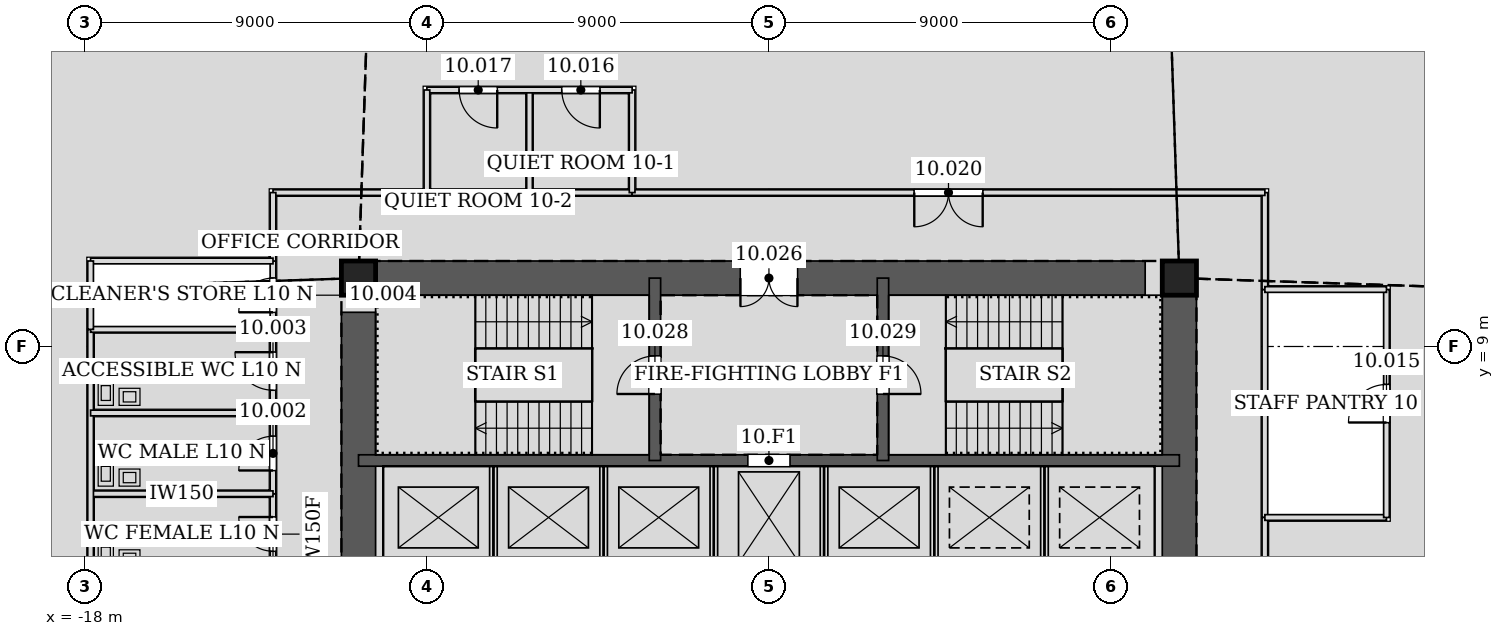
"""IFC4 building model, lengths in metres.
Left out: names, types, materials, properties, quantities, classifications, styles, units other than length and angle.
Written with IfcOpenShell. Run it as: python <this file> out.ifc"""

import sys

from ifc_helpers import new_model, si_unit, direction, frame, frame_2d, origin, origin_2d, place, context, subcontext, project, spatial, rectangle, hollow_rectangle, extrude, element, fill, save


model = new_model("IFC4")
c1 = context("Model", 3, precision=1e-05, world=origin(), true_north=direction((0.0, 1.0)))
c2 = subcontext(c1, "Body", "Model", "MODEL_VIEW")
j1 = project(units=[si_unit("LENGTHUNIT", "METRE"), si_unit("PLANEANGLEUNIT", "RADIAN")], contexts=[c1])
p1 = place(None, origin())
s1 = spatial("IfcSite", under=j1, at=p1, CompositionType="ELEMENT")
p2 = place(p1, origin())
s2 = spatial("IfcBuilding", under=s1, at=p2, CompositionType="ELEMENT")
p3 = place(p2, frame((0.0, 0.0, 49.8)))
s3 = spatial("IfcBuildingStorey", under=s2, at=p3, CompositionType="ELEMENT", Elevation=49.8)
for number, where, z_axis, x_axis in (
    (1, (10.8, 10.8, 0.0), (0.0, 0.0, 1.0), (1.0, 0.0, 0.0)),
    (2, (-10.8, 10.8, 0.0), (0.0, 0.0, 1.0), (1.0, 0.0, 0.0)),
):
    element("IfcColumn", number, at=place(p3, frame(where, z_axis=z_axis, x_axis=x_axis)), inside=s3, PredefinedType="COLUMN", context=c2, shape_type="SweptSolid", body=[
        extrude(hollow_rectangle(XDim=0.9, YDim=0.9, WallThickness=0.06, at=origin_2d()), origin(), (0.0, 0.0, 1.0), 4.2),
    ])
p4 = place(p3, frame((10.8, -10.8, 0.0), z_axis=(0.0, 0.0, 1.0), x_axis=(0.0, 1.0, 0.0)))
e3 = element("IfcWall", 3, at=p4, inside=s3, PredefinedType="SOLIDWALL", context=c2, shape_type="SweptSolid", body=[
    extrude(rectangle(XDim=21.6, YDim=0.9, at=frame_2d((10.8, 0.0))), origin(), (0.0, 0.0, 1.0), 4.2),
])
p5 = place(p4, frame((11.7, 0.0, 0.0)))
e4 = element("IfcOpeningElement", 4, at=p5, cuts=e3, PredefinedType="OPENING", context=c2, shape_type="SweptSolid", body=[
    extrude(rectangle(XDim=1.2, YDim=2.1, at=frame_2d((0.6, 1.05))), frame((0.0, 0.46, 0.0), z_axis=(0.0, -1.0, 0.0), x_axis=(1.0, 0.0, 0.0)), (0.0, 0.0, 1.0), 0.92),
])
p6 = place(p4, frame((8.7, 0.0, 0.0)))
e5 = element("IfcOpeningElement", 5, at=p6, cuts=e3, PredefinedType="OPENING", context=c2, shape_type="SweptSolid", body=[
    extrude(rectangle(XDim=1.2, YDim=2.1, at=frame_2d((0.6, 1.05))), frame((0.0, 0.46, 0.0), z_axis=(0.0, -1.0, 0.0), x_axis=(1.0, 0.0, 0.0)), (0.0, 0.0, 1.0), 0.92),
])
p7 = place(p3, frame((10.8, 10.8, 0.0), z_axis=(0.0, 0.0, 1.0), x_axis=(-1.0, 0.0, 0.0)))
e6 = element("IfcWall", 6, at=p7, inside=s3, PredefinedType="SOLIDWALL", context=c2, shape_type="SweptSolid", body=[
    extrude(rectangle(XDim=21.6, YDim=0.9, at=frame_2d((10.8, 0.0))), origin(), (0.0, 0.0, 1.0), 4.2),
])
p8 = place(p7, frame((10.05, 0.0, 0.0)))
e7 = element("IfcOpeningElement", 7, at=p8, cuts=e6, PredefinedType="OPENING", context=c2, shape_type="SweptSolid", body=[
    extrude(rectangle(XDim=1.5, YDim=2.1, at=frame_2d((0.75, 1.05))), frame((0.0, 0.46, 0.0), z_axis=(0.0, -1.0, 0.0), x_axis=(1.0, 0.0, 0.0)), (0.0, 0.0, 1.0), 0.92),
])
p9 = place(p3, frame((-10.8, 10.8, 0.0), z_axis=(0.0, 0.0, 1.0), x_axis=(0.0, -1.0, 0.0)))
e8 = element("IfcWall", 8, at=p9, inside=s3, PredefinedType="SOLIDWALL", context=c2, shape_type="SweptSolid", body=[
    extrude(rectangle(XDim=21.6, YDim=0.9, at=frame_2d((10.8, 0.0))), origin(), (0.0, 0.0, 1.0), 4.2),
])
p10 = place(p9, frame((8.7, 0.0, 0.0)))
e9 = element("IfcOpeningElement", 9, at=p10, cuts=e8, PredefinedType="OPENING", context=c2, shape_type="SweptSolid", body=[
    extrude(rectangle(XDim=1.2, YDim=2.1, at=frame_2d((0.6, 1.05))), frame((0.0, 0.46, 0.0), z_axis=(0.0, -1.0, 0.0), x_axis=(1.0, 0.0, 0.0)), (0.0, 0.0, 1.0), 0.92),
])
p11 = place(p9, frame((11.7, 0.0, 0.0)))
e10 = element("IfcOpeningElement", 10, at=p11, cuts=e8, PredefinedType="OPENING", context=c2, shape_type="SweptSolid", body=[
    extrude(rectangle(XDim=1.2, YDim=2.1, at=frame_2d((0.6, 1.05))), frame((0.0, 0.46, 0.0), z_axis=(0.0, -1.0, 0.0), x_axis=(1.0, 0.0, 0.0)), (0.0, 0.0, 1.0), 0.92),
])
p12 = place(p3, frame((-10.8, 6.0, 0.0), z_axis=(0.0, 0.0, 1.0), x_axis=(1.0, 0.0, 0.0)))
e11 = element("IfcWall", 11, at=p12, inside=s3, PredefinedType="SOLIDWALL", context=c2, shape_type="SweptSolid", body=[
    extrude(rectangle(XDim=21.6, YDim=0.3, at=frame_2d((10.8, 0.0))), origin(), (0.0, 0.0, 1.0), 4.2),
])
p13 = place(p12, frame((10.25, 0.0, 0.0)))
e12 = element("IfcOpeningElement", 12, at=p13, cuts=e11, PredefinedType="OPENING", context=c2, shape_type="SweptSolid", body=[
    extrude(rectangle(XDim=1.1, YDim=2.1, at=frame_2d((0.55, 1.05))), frame((0.0, 0.16, 0.0), z_axis=(0.0, -1.0, 0.0), x_axis=(1.0, 0.0, 0.0)), (0.0, 0.0, 1.0), 0.32),
])
p14 = place(p3, frame((-3.0, 6.0, 0.0), z_axis=(0.0, 0.0, 1.0), x_axis=(0.0, 1.0, 0.0)))
e13 = element("IfcWall", 13, at=p14, inside=s3, PredefinedType="SOLIDWALL", context=c2, shape_type="SweptSolid", body=[
    extrude(rectangle(XDim=4.8, YDim=0.3, at=frame_2d((2.4, 0.0))), origin(), (0.0, 0.0, 1.0), 4.2),
])
p15 = place(p14, frame((1.75, 0.0, 0.0)))
e14 = element("IfcOpeningElement", 14, at=p15, cuts=e13, PredefinedType="OPENING", context=c2, shape_type="SweptSolid", body=[
    extrude(rectangle(XDim=1.0, YDim=2.1, at=frame_2d((0.5, 1.05))), frame((0.0, 0.16, 0.0), z_axis=(0.0, -1.0, 0.0), x_axis=(1.0, 0.0, 0.0)), (0.0, 0.0, 1.0), 0.32),
])
p16 = place(p3, frame((3.0, 6.0, 0.0), z_axis=(0.0, 0.0, 1.0), x_axis=(0.0, 1.0, 0.0)))
e15 = element("IfcWall", 15, at=p16, inside=s3, PredefinedType="SOLIDWALL", context=c2, shape_type="SweptSolid", body=[
    extrude(rectangle(XDim=4.8, YDim=0.3, at=frame_2d((2.4, 0.0))), origin(), (0.0, 0.0, 1.0), 4.2),
])
p17 = place(p16, frame((1.75, 0.0, 0.0)))
e16 = element("IfcOpeningElement", 16, at=p17, cuts=e15, PredefinedType="OPENING", context=c2, shape_type="SweptSolid", body=[
    extrude(rectangle(XDim=1.0, YDim=2.1, at=frame_2d((0.5, 1.05))), frame((0.0, 0.16, 0.0), z_axis=(0.0, -1.0, 0.0), x_axis=(1.0, 0.0, 0.0)), (0.0, 0.0, 1.0), 0.32),
])
p18 = place(p3, frame((-13.05, 5.126, 0.0), z_axis=(0.0, 0.0, 1.0), x_axis=(0.0, -1.0, 0.0)))
e17 = element("IfcWall", 17, at=p18, inside=s3, PredefinedType="PARTITIONING", context=c2, shape_type="SweptSolid", body=[
    extrude(rectangle(XDim=2.127, YDim=0.15, at=frame_2d((1.063, 0.0))), origin(), (0.0, 0.0, 1.0), 4.035),
])
p19 = place(p18, frame((0.614, 0.0, 0.0)))
e18 = element("IfcOpeningElement", 18, at=p19, cuts=e17, PredefinedType="OPENING", context=c2, shape_type="SweptSolid", body=[
    extrude(rectangle(XDim=0.9, YDim=2.1, at=frame_2d((0.45, 1.05))), frame((0.0, 0.085, 0.0), z_axis=(0.0, -1.0, 0.0), x_axis=(1.0, 0.0, 0.0)), (0.0, 0.0, 1.0), 0.17),
])
p20 = place(p3, frame((-13.05, 7.251, 0.0), z_axis=(0.0, 0.0, 1.0), x_axis=(0.0, -1.0, 0.0)))
e19 = element("IfcWall", 19, at=p20, inside=s3, PredefinedType="PARTITIONING", context=c2, shape_type="SweptSolid", body=[
    extrude(rectangle(XDim=2.127, YDim=0.15, at=frame_2d((1.063, 0.0))), origin(), (0.0, 0.0, 1.0), 4.035),
])
p21 = place(p20, frame((0.614, 0.0, 0.0)))
e20 = element("IfcOpeningElement", 20, at=p21, cuts=e19, PredefinedType="OPENING", context=c2, shape_type="SweptSolid", body=[
    extrude(rectangle(XDim=0.9, YDim=2.1, at=frame_2d((0.45, 1.05))), frame((0.0, 0.085, 0.0), z_axis=(0.0, -1.0, 0.0), x_axis=(1.0, 0.0, 0.0)), (0.0, 0.0, 1.0), 0.17),
])
p22 = place(p3, frame((-13.05, 9.451, 0.0), z_axis=(0.0, 0.0, 1.0), x_axis=(0.0, -1.0, 0.0)))
e21 = element("IfcWall", 21, at=p22, inside=s3, PredefinedType="PARTITIONING", context=c2, shape_type="SweptSolid", body=[
    extrude(rectangle(XDim=2.202, YDim=0.15, at=frame_2d((1.101, 0.0))), origin(), (0.0, 0.0, 1.0), 4.035),
])
p23 = place(p22, frame((0.601, 0.0, 0.0)))
e22 = element("IfcOpeningElement", 22, at=p23, cuts=e21, PredefinedType="OPENING", context=c2, shape_type="SweptSolid", body=[
    extrude(rectangle(XDim=1.0, YDim=2.1, at=frame_2d((0.5, 1.05))), frame((0.0, 0.085, 0.0), z_axis=(0.0, -1.0, 0.0), x_axis=(1.0, 0.0, 0.0)), (0.0, 0.0, 1.0), 0.17),
])
p24 = place(p3, frame((-13.05, 11.251, 0.0), z_axis=(0.0, 0.0, 1.0), x_axis=(0.0, -1.0, 0.0)))
e23 = element("IfcWall", 23, at=p24, inside=s3, PredefinedType="PARTITIONING", context=c2, shape_type="SweptSolid", body=[
    extrude(rectangle(XDim=1.802, YDim=0.15, at=frame_2d((0.901, 0.0))), origin(), (0.0, 0.0, 1.0), 3.014),
])
p25 = place(p24, frame((0.451, 0.0, 0.0)))
e24 = element("IfcOpeningElement", 24, at=p25, cuts=e23, PredefinedType="OPENING", context=c2, shape_type="SweptSolid", body=[
    extrude(rectangle(XDim=0.9, YDim=2.1, at=frame_2d((0.45, 1.05))), frame((0.0, 0.085, 0.0), z_axis=(0.0, -1.0, 0.0), x_axis=(1.0, 0.0, 0.0)), (0.0, 0.0, 1.0), 0.17),
])
p26 = place(p3, frame((13.05, 4.499, 0.0), z_axis=(0.0, 0.0, 1.0), x_axis=(0.0, 1.0, 0.0)))
e25 = element("IfcWall", 25, at=p26, inside=s3, PredefinedType="PARTITIONING", context=c2, shape_type="SweptSolid", body=[
    extrude(rectangle(XDim=6.002, YDim=0.15, at=frame_2d((3.001, 0.0))), origin(), (0.0, 0.0, 1.0), 4.035),
])
for number, where, z_axis, x_axis in (
    (26, (-3.599, 13.05, 0.0), (0.0, 0.0, 1.0), (-1.0, 0.0, 0.0)),
    (27, (-6.299, 13.05, 0.0), (0.0, 0.0, 1.0), (-1.0, 0.0, 0.0)),
):
    element("IfcWall", number, at=place(p3, frame(where, z_axis=z_axis, x_axis=x_axis)), inside=s3, PredefinedType="PARTITIONING", context=c2, shape_type="SweptSolid", body=[
        extrude(rectangle(XDim=2.702, YDim=0.15, at=frame_2d((1.351, 0.0))), origin(), (0.0, 0.0, 1.0), 4.035),
    ])
p27 = place(p3, frame((-8.999, 13.05, 0.0), z_axis=(0.0, 0.0, 1.0), x_axis=(-1.0, 0.0, 0.0)))
e28 = element("IfcWall", 28, at=p27, inside=s3, PredefinedType="PARTITIONING", context=c2, shape_type="SweptSolid", body=[
    extrude(rectangle(XDim=4.051, YDim=0.15, at=frame_2d((2.025, 0.0))), origin(), (0.0, 0.0, 1.0), 3.014),
])
p28 = place(p3, frame((-13.05, 13.05, 0.0), z_axis=(0.0, 0.0, 1.0), x_axis=(0.0, -1.0, 0.0)))
e29 = element("IfcWall", 29, at=p28, inside=s3, PredefinedType="PARTITIONING", context=c2, shape_type="SweptSolid", body=[
    extrude(rectangle(XDim=1.801, YDim=0.15, at=frame_2d((0.9, 0.0))), origin(), (0.0, 0.0, 1.0), 3.098),
])
p29 = place(p3, frame((13.05, 10.499, 0.0), z_axis=(0.0, 0.0, 1.0), x_axis=(0.0, 1.0, 0.0)))
e30 = element("IfcWall", 30, at=p29, inside=s3, PredefinedType="PARTITIONING", context=c2, shape_type="SweptSolid", body=[
    extrude(rectangle(XDim=2.551, YDim=0.15, at=frame_2d((1.275, 0.0))), origin(), (0.0, 0.0, 1.0), 3.014),
])
p30 = place(p3, frame((13.05, 13.05, 0.0), z_axis=(0.0, 0.0, 1.0), x_axis=(-1.0, 0.0, 0.0)))
e31 = element("IfcWall", 31, at=p30, inside=s3, PredefinedType="PARTITIONING", context=c2, shape_type="SweptSolid", body=[
    extrude(rectangle(XDim=16.651, YDim=0.15, at=frame_2d((8.326, 0.0))), origin(), (0.0, 0.0, 1.0), 2.984),
])
p31 = place(p30, frame((7.426, 0.0, 0.0)))
e32 = element("IfcOpeningElement", 32, at=p31, cuts=e31, PredefinedType="OPENING", context=c2, shape_type="SweptSolid", body=[
    extrude(rectangle(XDim=1.8, YDim=2.4, at=frame_2d((0.9, 1.2))), frame((0.0, 0.085, 0.0), z_axis=(0.0, -1.0, 0.0), x_axis=(1.0, 0.0, 0.0)), (0.0, 0.0, 1.0), 0.17),
])
p32 = place(p3, frame((13.05, 1.499, 0.0), z_axis=(0.0, 0.0, 1.0), x_axis=(0.0, 1.0, 0.0)))
e33 = element("IfcWall", 33, at=p32, inside=s3, PredefinedType="PARTITIONING", context=c2, shape_type="SweptSolid", body=[
    extrude(rectangle(XDim=3.002, YDim=0.15, at=frame_2d((1.501, 0.0))), origin(), (0.0, 0.0, 1.0), 4.035),
])
p33 = place(p3, frame((-13.05, 5.125, 0.0), z_axis=(0.0, 0.0, 1.0), x_axis=(-1.0, 0.0, 0.0)))
e34 = element("IfcWall", 34, at=p33, inside=s3, PredefinedType="PARTITIONING", context=c2, shape_type="SweptSolid", body=[
    extrude(rectangle(XDim=4.8, YDim=0.15, at=frame_2d((2.4, 0.0))), origin(), (0.0, 0.0, 1.0), 3.423),
])
p34 = place(p3, frame((-17.85, 3.0, 0.0), z_axis=(0.0, 0.0, 1.0), x_axis=(0.0, 1.0, 0.0)))
e35 = element("IfcWall", 35, at=p34, inside=s3, PredefinedType="PARTITIONING", context=c2, shape_type="SweptSolid", body=[
    extrude(rectangle(XDim=6.45, YDim=0.15, at=frame_2d((3.225, 0.0))), origin(), (0.0, 0.0, 1.0), 4.035),
])
for number, where, z_axis, x_axis in (
    (36, (-13.05, 7.25, 0.0), (0.0, 0.0, 1.0), (-1.0, 0.0, 0.0)),
    (37, (-13.05, 9.45, 0.0), (0.0, 0.0, 1.0), (-1.0, 0.0, 0.0)),
):
    element("IfcWall", number, at=place(p3, frame(where, z_axis=z_axis, x_axis=x_axis)), inside=s3, PredefinedType="PARTITIONING", context=c2, shape_type="SweptSolid", body=[
        extrude(rectangle(XDim=4.8, YDim=0.15, at=frame_2d((2.4, 0.0))), origin(), (0.0, 0.0, 1.0), 3.423),
    ])
p35 = place(p3, frame((-13.05, 11.25, 0.0), z_axis=(0.0, 0.0, 1.0), x_axis=(-1.0, 0.0, 0.0)))
e38 = element("IfcWall", 38, at=p35, inside=s3, PredefinedType="PARTITIONING", context=c2, shape_type="SweptSolid", body=[
    extrude(rectangle(XDim=4.8, YDim=0.15, at=frame_2d((2.4, 0.0))), origin(), (0.0, 0.0, 1.0), 3.715),
])
p36 = place(p3, frame((-17.85, 11.25, 0.0), z_axis=(0.0, 0.0, 1.0), x_axis=(0.0, -1.0, 0.0)))
e39 = element("IfcWall", 39, at=p36, inside=s3, PredefinedType="PARTITIONING", context=c2, shape_type="SweptSolid", body=[
    extrude(rectangle(XDim=1.8, YDim=0.15, at=frame_2d((0.9, 0.0))), origin(), (0.0, 0.0, 1.0), 3.014),
])
p37 = place(p3, frame((13.05, 4.5, 0.0), z_axis=(0.0, 0.0, 1.0), x_axis=(1.0, 0.0, 0.0)))
e40 = element("IfcWall", 40, at=p37, inside=s3, PredefinedType="PARTITIONING", context=c2, shape_type="SweptSolid", body=[
    extrude(rectangle(XDim=3.2, YDim=0.15, at=frame_2d((1.6, 0.0))), origin(), (0.0, 0.0, 1.0), 3.423),
])
p38 = place(p3, frame((16.25, 4.5, 0.0), z_axis=(0.0, 0.0, 1.0), x_axis=(0.0, 1.0, 0.0)))
e41 = element("IfcWall", 41, at=p38, inside=s3, PredefinedType="PARTITIONING", context=c2, shape_type="SweptSolid", body=[
    extrude(rectangle(XDim=6.0, YDim=0.15, at=frame_2d((3.0, 0.0))), origin(), (0.0, 0.0, 1.0), 3.014),
])
p39 = place(p38, frame((2.5, 0.0, 0.0)))
e42 = element("IfcOpeningElement", 42, at=p39, cuts=e41, PredefinedType="OPENING", context=c2, shape_type="SweptSolid", body=[
    extrude(rectangle(XDim=1.0, YDim=2.1, at=frame_2d((0.5, 1.05))), frame((0.0, 0.085, 0.0), z_axis=(0.0, -1.0, 0.0), x_axis=(1.0, 0.0, 0.0)), (0.0, 0.0, 1.0), 0.17),
])
p40 = place(p3, frame((16.25, 10.5, 0.0), z_axis=(0.0, 0.0, 1.0), x_axis=(-1.0, 0.0, 0.0)))
e43 = element("IfcWall", 43, at=p40, inside=s3, PredefinedType="PARTITIONING", context=c2, shape_type="SweptSolid", body=[
    extrude(rectangle(XDim=3.2, YDim=0.15, at=frame_2d((1.6, 0.0))), origin(), (0.0, 0.0, 1.0), 3.014),
])
for number, where, z_axis, x_axis in (
    (44, (-6.3, 15.75, 0.0), (0.0, 0.0, 1.0), (0.0, -1.0, 0.0)),
    (45, (-3.6, 13.05, 0.0), (0.0, 0.0, 1.0), (0.0, 1.0, 0.0)),
):
    element("IfcWall", number, at=place(p3, frame(where, z_axis=z_axis, x_axis=x_axis)), inside=s3, PredefinedType="PARTITIONING", context=c2, shape_type="SweptSolid", body=[
        extrude(rectangle(XDim=2.7, YDim=0.15, at=frame_2d((1.35, 0.0))), origin(), (0.0, 0.0, 1.0), 3.423),
    ])
p41 = place(p3, frame((-3.6, 15.75, 0.0), z_axis=(0.0, 0.0, 1.0), x_axis=(-1.0, 0.0, 0.0)))
e46 = element("IfcWall", 46, at=p41, inside=s3, PredefinedType="PARTITIONING", context=c2, shape_type="SweptSolid", body=[
    extrude(rectangle(XDim=5.4, YDim=0.15, at=frame_2d((2.7, 0.0))), origin(), (0.0, 0.0, 1.0), 4.035),
])
p42 = place(p41, frame((0.85, 0.0, 0.0)))
e47 = element("IfcOpeningElement", 47, at=p42, cuts=e46, PredefinedType="OPENING", context=c2, shape_type="SweptSolid", body=[
    extrude(rectangle(XDim=1.0, YDim=2.1, at=frame_2d((0.5, 1.05))), frame((0.0, 0.085, 0.0), z_axis=(0.0, -1.0, 0.0), x_axis=(1.0, 0.0, 0.0)), (0.0, 0.0, 1.0), 0.17),
])
p43 = place(p41, frame((3.55, 0.0, 0.0)))
e48 = element("IfcOpeningElement", 48, at=p43, cuts=e46, PredefinedType="OPENING", context=c2, shape_type="SweptSolid", body=[
    extrude(rectangle(XDim=1.0, YDim=2.1, at=frame_2d((0.5, 1.05))), frame((0.0, 0.085, 0.0), z_axis=(0.0, -1.0, 0.0), x_axis=(1.0, 0.0, 0.0)), (0.0, 0.0, 1.0), 0.17),
])
p44 = place(p3, frame((-9.0, 15.75, 0.0), z_axis=(0.0, 0.0, 1.0), x_axis=(0.0, -1.0, 0.0)))
e49 = element("IfcWall", 49, at=p44, inside=s3, PredefinedType="PARTITIONING", context=c2, shape_type="SweptSolid", body=[
    extrude(rectangle(XDim=2.7, YDim=0.15, at=frame_2d((1.35, 0.0))), origin(), (0.0, 0.0, 1.0), 3.423),
])
for number, where, z_axis, x_axis in (
    (50, (-7.25, 3.15, 0.0), (0.0, 0.0, 1.0), (0.0, 1.0, 0.0)),
    (51, (-4.35, 3.15, 0.0), (0.0, 0.0, 1.0), (0.0, 1.0, 0.0)),
    (52, (-1.45, 3.15, 0.0), (0.0, 0.0, 1.0), (0.0, 1.0, 0.0)),
    (53, (1.45, 3.15, 0.0), (0.0, 0.0, 1.0), (0.0, 1.0, 0.0)),
    (54, (4.35, 3.15, 0.0), (0.0, 0.0, 1.0), (0.0, 1.0, 0.0)),
    (55, (7.25, 3.15, 0.0), (0.0, 0.0, 1.0), (0.0, 1.0, 0.0)),
):
    element("IfcWall", number, at=place(p3, frame(where, z_axis=z_axis, x_axis=x_axis)), inside=s3, PredefinedType="PARTITIONING", context=c2, shape_type="SweptSolid", body=[
        extrude(rectangle(XDim=2.7, YDim=0.2, at=frame_2d((1.35, 0.0))), origin(), (0.0, 0.0, 1.0), 4.2),
    ])
p45 = place(p19, frame((0.9, 0.0, 0.0), z_axis=(0.0, 0.0, 1.0), x_axis=(-1.0, 0.0, 0.0)))
e56 = element("IfcDoor", 56, at=p45, inside=s3, OperationType="SINGLE_SWING_RIGHT", PredefinedType="DOOR", context=c2, shape_type="SweptSolid", body=[
    extrude(rectangle(XDim=0.9, YDim=2.1, at=frame_2d((0.45, 1.05))), frame((0.0, 0.025, 0.0), z_axis=(0.0, -1.0, 0.0), x_axis=(1.0, 0.0, 0.0)), (0.0, 0.0, 1.0), 0.05),
])
fill(e18, e56)
p46 = place(p21, frame((0.9, 0.0, 0.0), z_axis=(0.0, 0.0, 1.0), x_axis=(-1.0, 0.0, 0.0)))
e57 = element("IfcDoor", 57, at=p46, inside=s3, OperationType="SINGLE_SWING_LEFT", PredefinedType="DOOR", context=c2, shape_type="SweptSolid", body=[
    extrude(rectangle(XDim=0.9, YDim=2.1, at=frame_2d((0.45, 1.05))), frame((0.0, 0.025, 0.0), z_axis=(0.0, -1.0, 0.0), x_axis=(1.0, 0.0, 0.0)), (0.0, 0.0, 1.0), 0.05),
])
fill(e20, e57)
p47 = place(p23, frame((1.0, 0.0, 0.0), z_axis=(0.0, 0.0, 1.0), x_axis=(-1.0, 0.0, 0.0)))
e58 = element("IfcDoor", 58, at=p47, inside=s3, OperationType="SINGLE_SWING_RIGHT", PredefinedType="DOOR", context=c2, shape_type="SweptSolid", body=[
    extrude(rectangle(XDim=1.0, YDim=2.1, at=frame_2d((0.5, 1.05))), frame((0.0, 0.025, 0.0), z_axis=(0.0, -1.0, 0.0), x_axis=(1.0, 0.0, 0.0)), (0.0, 0.0, 1.0), 0.05),
])
fill(e22, e58)
p48 = place(p25, frame((0.9, 0.0, 0.0), z_axis=(0.0, 0.0, 1.0), x_axis=(-1.0, 0.0, 0.0)))
e59 = element("IfcDoor", 59, at=p48, inside=s3, OperationType="SINGLE_SWING_LEFT", PredefinedType="DOOR", context=c2, shape_type="SweptSolid", body=[
    extrude(rectangle(XDim=0.9, YDim=2.1, at=frame_2d((0.45, 1.05))), frame((0.0, 0.025, 0.0), z_axis=(0.0, -1.0, 0.0), x_axis=(1.0, 0.0, 0.0)), (0.0, 0.0, 1.0), 0.05),
])
fill(e24, e59)
p49 = place(p39, origin())
e60 = element("IfcDoor", 60, at=p49, inside=s3, OperationType="SINGLE_SWING_LEFT", PredefinedType="DOOR", context=c2, shape_type="SweptSolid", body=[
    extrude(rectangle(XDim=1.0, YDim=2.1, at=frame_2d((0.5, 1.05))), frame((0.0, 0.025, 0.0), z_axis=(0.0, -1.0, 0.0), x_axis=(1.0, 0.0, 0.0)), (0.0, 0.0, 1.0), 0.05),
])
fill(e42, e60)
p50 = place(p42, origin())
e61 = element("IfcDoor", 61, at=p50, inside=s3, OperationType="SINGLE_SWING_LEFT", PredefinedType="DOOR", context=c2, shape_type="SweptSolid", body=[
    extrude(rectangle(XDim=1.0, YDim=2.1, at=frame_2d((0.5, 1.05))), frame((0.0, 0.025, 0.0), z_axis=(0.0, -1.0, 0.0), x_axis=(1.0, 0.0, 0.0)), (0.0, 0.0, 1.0), 0.05),
])
fill(e47, e61)
p51 = place(p43, origin())
e62 = element("IfcDoor", 62, at=p51, inside=s3, OperationType="SINGLE_SWING_LEFT", PredefinedType="DOOR", context=c2, shape_type="SweptSolid", body=[
    extrude(rectangle(XDim=1.0, YDim=2.1, at=frame_2d((0.5, 1.05))), frame((0.0, 0.025, 0.0), z_axis=(0.0, -1.0, 0.0), x_axis=(1.0, 0.0, 0.0)), (0.0, 0.0, 1.0), 0.05),
])
fill(e48, e62)
p52 = place(p31, origin())
e63 = element("IfcDoor", 63, at=p52, inside=s3, OperationType="DOUBLE_DOOR_SINGLE_SWING", PredefinedType="DOOR", context=c2, shape_type="SweptSolid", body=[
    extrude(rectangle(XDim=1.8, YDim=2.4, at=frame_2d((0.9, 1.2))), frame((0.0, 0.025, 0.0), z_axis=(0.0, -1.0, 0.0), x_axis=(1.0, 0.0, 0.0)), (0.0, 0.0, 1.0), 0.05),
])
fill(e32, e63)
p53 = place(p8, origin())
e64 = element("IfcDoor", 64, at=p53, inside=s3, OperationType="DOUBLE_DOOR_SINGLE_SWING", PredefinedType="DOOR", context=c2, shape_type="SweptSolid", body=[
    extrude(rectangle(XDim=1.5, YDim=2.1, at=frame_2d((0.75, 1.05))), frame((0.0, 0.025, 0.0), z_axis=(0.0, -1.0, 0.0), x_axis=(1.0, 0.0, 0.0)), (0.0, 0.0, 1.0), 0.05),
])
fill(e7, e64)
p54 = place(p15, origin())
e65 = element("IfcDoor", 65, at=p54, inside=s3, OperationType="SINGLE_SWING_LEFT", PredefinedType="DOOR", context=c2, shape_type="SweptSolid", body=[
    extrude(rectangle(XDim=1.0, YDim=2.1, at=frame_2d((0.5, 1.05))), frame((0.0, 0.025, 0.0), z_axis=(0.0, -1.0, 0.0), x_axis=(1.0, 0.0, 0.0)), (0.0, 0.0, 1.0), 0.05),
])
fill(e14, e65)
p55 = place(p17, frame((1.0, 0.0, 0.0), z_axis=(0.0, 0.0, 1.0), x_axis=(-1.0, 0.0, 0.0)))
e66 = element("IfcDoor", 66, at=p55, inside=s3, OperationType="SINGLE_SWING_RIGHT", PredefinedType="DOOR", context=c2, shape_type="SweptSolid", body=[
    extrude(rectangle(XDim=1.0, YDim=2.1, at=frame_2d((0.5, 1.05))), frame((0.0, 0.025, 0.0), z_axis=(0.0, -1.0, 0.0), x_axis=(1.0, 0.0, 0.0)), (0.0, 0.0, 1.0), 0.05),
])
fill(e16, e66)
p56 = place(p13, origin())
e67 = element("IfcDoor", 67, at=p56, inside=s3, OperationType="DOUBLE_DOOR_SLIDING", PredefinedType="DOOR", context=c2, shape_type="SweptSolid", body=[
    extrude(rectangle(XDim=1.1, YDim=2.1, at=frame_2d((0.55, 1.05))), frame((0.0, 0.025, 0.0), z_axis=(0.0, -1.0, 0.0), x_axis=(1.0, 0.0, 0.0)), (0.0, 0.0, 1.0), 0.05),
])
fill(e12, e67)
save(model, sys.argv[1])
